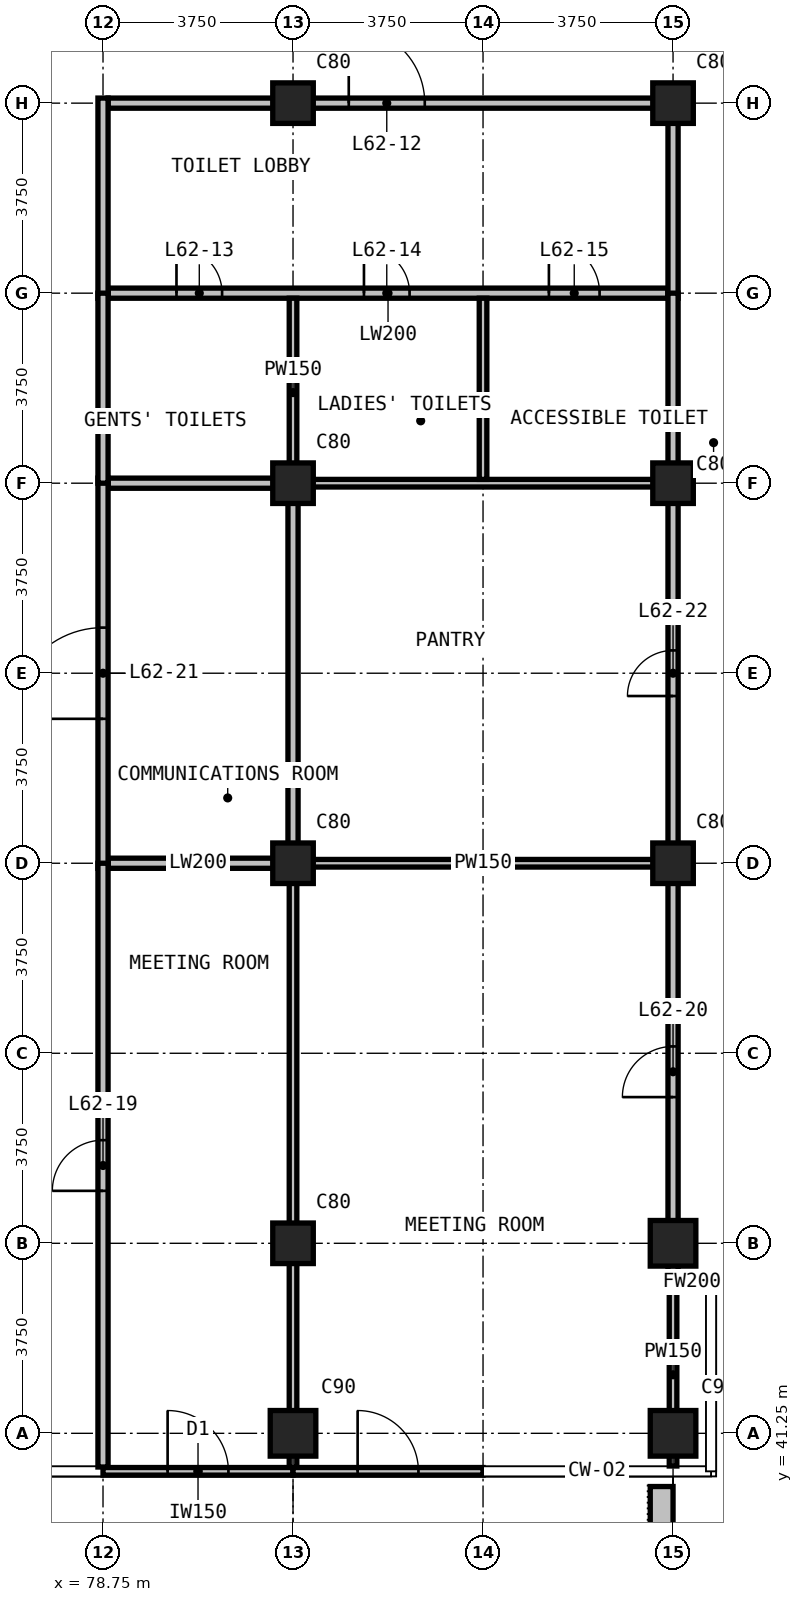
"""IFC4 building model, lengths in metres.
Left out: names, types, materials, properties, quantities, classifications, styles, units other than length and angle.
Written with IfcOpenShell. Run it as: python <this file> out.ifc"""

import sys

from ifc_helpers import new_model, si_unit, direction, frame, frame_2d, origin, origin_2d, place, context, subcontext, project, spatial, rectangle, extrude, element, fill, save


model = new_model("IFC4")
c1 = context("Model", 3, precision=1e-05, world=origin(), true_north=direction((0.0, 1.0)))
c2 = subcontext(c1, "Body", "Model", "MODEL_VIEW")
j1 = project(units=[si_unit("LENGTHUNIT", "METRE"), si_unit("PLANEANGLEUNIT", "RADIAN")], contexts=[c1])
p1 = place(None, origin())
s1 = spatial("IfcSite", under=j1, at=p1, CompositionType="ELEMENT")
p2 = place(p1, origin())
s2 = spatial("IfcBuilding", under=s1, at=p2, CompositionType="ELEMENT")
p3 = place(p2, frame((0.0, 0.0, 239.1)))
s3 = spatial("IfcBuildingStorey", under=s2, at=p3, CompositionType="ELEMENT", Elevation=239.1)
p4 = place(p3, frame((82.5, 41.25, 0.0), z_axis=(0.0, 0.0, 1.0), x_axis=(1.0, 0.0, 0.0)))
e1 = element("IfcColumn", 1, at=p4, inside=s3, PredefinedType="COLUMN", context=c2, shape_type="SweptSolid", body=[
    extrude(rectangle(XDim=0.9, YDim=0.9, at=origin_2d()), origin(), (0.0, 0.0, 1.0), 3.6),
])
for number, where, z_axis, x_axis in (
    (2, (82.5, 45.0, 0.0), (0.0, 0.0, 1.0), (1.0, 0.0, 0.0)),
    (3, (82.5, 52.5, 0.0), (0.0, 0.0, 1.0), (1.0, 0.0, 0.0)),
    (4, (82.5, 60.0, 0.0), (0.0, 0.0, 1.0), (1.0, 0.0, 0.0)),
    (5, (82.5, 67.5, 0.0), (0.0, 0.0, 1.0), (1.0, 0.0, 0.0)),
):
    element("IfcColumn", number, at=place(p3, frame(where, z_axis=z_axis, x_axis=x_axis)), inside=s3, PredefinedType="COLUMN", context=c2, shape_type="SweptSolid", body=[
        extrude(rectangle(XDim=0.8, YDim=0.8, at=origin_2d()), origin(), (0.0, 0.0, 1.0), 3.6),
    ])
for number, where, z_axis, x_axis in (
    (6, (90.0, 41.25, 0.0), (0.0, 0.0, 1.0), (1.0, 0.0, 0.0)),
    (7, (90.0, 45.0, 0.0), (0.0, 0.0, 1.0), (1.0, 0.0, 0.0)),
):
    element("IfcColumn", number, at=place(p3, frame(where, z_axis=z_axis, x_axis=x_axis)), inside=s3, PredefinedType="COLUMN", context=c2, shape_type="SweptSolid", body=[
        extrude(rectangle(XDim=0.9, YDim=0.9, at=origin_2d()), origin(), (0.0, 0.0, 1.0), 3.6),
    ])
for number, where, z_axis, x_axis in (
    (8, (90.0, 52.5, 0.0), (0.0, 0.0, 1.0), (1.0, 0.0, 0.0)),
    (9, (90.0, 60.0, 0.0), (0.0, 0.0, 1.0), (1.0, 0.0, 0.0)),
    (10, (90.0, 67.5, 0.0), (0.0, 0.0, 1.0), (1.0, 0.0, 0.0)),
):
    element("IfcColumn", number, at=place(p3, frame(where, z_axis=z_axis, x_axis=x_axis)), inside=s3, PredefinedType="COLUMN", context=c2, shape_type="SweptSolid", body=[
        extrude(rectangle(XDim=0.8, YDim=0.8, at=origin_2d()), origin(), (0.0, 0.0, 1.0), 3.6),
    ])
p5 = place(p3, frame((78.75, 40.5, 0.0), z_axis=(0.0, 0.0, 1.0), x_axis=(1.0, 0.0, 0.0)))
e11 = element("IfcWall", 11, at=p5, inside=s3, PredefinedType="SOLIDWALL", context=c2, shape_type="SweptSolid", body=[
    extrude(rectangle(XDim=3.75, YDim=0.15, at=frame_2d((1.875, 0.0))), origin(), (0.0, 0.0, 1.0), 3.3),
])
p6 = place(p5, frame((1.275, 0.0, 0.0)))
e12 = element("IfcOpeningElement", 12, at=p6, cuts=e11, PredefinedType="OPENING", context=c2, shape_type="SweptSolid", body=[
    extrude(rectangle(XDim=1.2, YDim=2.4, at=frame_2d((0.6, 1.2))), frame((0.0, 0.085, 0.0), z_axis=(0.0, -1.0, 0.0), x_axis=(1.0, 0.0, 0.0)), (0.0, 0.0, 1.0), 0.17),
])
p7 = place(p3, frame((82.5, 40.5, 0.0), z_axis=(0.0, 0.0, 1.0), x_axis=(1.0, 0.0, 0.0)))
e13 = element("IfcWall", 13, at=p7, inside=s3, PredefinedType="SOLIDWALL", context=c2, shape_type="SweptSolid", body=[
    extrude(rectangle(XDim=3.75, YDim=0.15, at=frame_2d((1.875, 0.0))), origin(), (0.0, 0.0, 1.0), 3.3),
])
p8 = place(p7, frame((1.275, 0.0, 0.0)))
e14 = element("IfcOpeningElement", 14, at=p8, cuts=e13, PredefinedType="OPENING", context=c2, shape_type="SweptSolid", body=[
    extrude(rectangle(XDim=1.2, YDim=2.4, at=frame_2d((0.6, 1.2))), frame((0.0, 0.085, 0.0), z_axis=(0.0, -1.0, 0.0), x_axis=(1.0, 0.0, 0.0)), (0.0, 0.0, 1.0), 0.17),
])
p9 = place(p3, frame((89.775, 40.2, 0.0), z_axis=(0.0, 0.0, 1.0), x_axis=(0.0, -1.0, 0.0)))
e15 = element("IfcWall", 15, at=p9, inside=s3, PredefinedType="USERDEFINED", context=c2, shape_type="SweptSolid", body=[
    extrude(rectangle(XDim=2.35, YDim=0.45, at=frame_2d((1.175, 0.0))), origin(), (0.0, 0.0, 1.0), 1.1),
])
for number, where, z_axis, x_axis in (
    (16, (78.85, 52.5, 0.0), (0.0, 0.0, 1.0), (1.0, 0.0, 0.0)),
    (17, (78.85, 60.0, 0.0), (0.0, 0.0, 1.0), (1.0, 0.0, 0.0)),
):
    element("IfcWall", number, at=place(p3, frame(where, z_axis=z_axis, x_axis=x_axis)), inside=s3, PredefinedType="PARTITIONING", context=c2, shape_type="SweptSolid", body=[
        extrude(rectangle(XDim=3.55, YDim=0.2, at=frame_2d((1.775, 0.0))), origin(), (0.0, 0.0, 1.0), 3.3),
    ])
p10 = place(p3, frame((78.85, 63.75, 0.0), z_axis=(0.0, 0.0, 1.0), x_axis=(1.0, 0.0, 0.0)))
e18 = element("IfcWall", 18, at=p10, inside=s3, PredefinedType="PARTITIONING", context=c2, shape_type="SweptSolid", body=[
    extrude(rectangle(XDim=11.05, YDim=0.2, at=frame_2d((5.525, 0.0))), origin(), (0.0, 0.0, 1.0), 3.3),
])
p11 = place(p10, frame((1.35, 0.0, 0.0)))
e19 = element("IfcOpeningElement", 19, at=p11, cuts=e18, PredefinedType="OPENING", context=c2, shape_type="SweptSolid", body=[
    extrude(rectangle(XDim=0.9, YDim=2.2, at=frame_2d((0.45, 1.1))), frame((0.0, 0.11, 0.0), z_axis=(0.0, -1.0, 0.0), x_axis=(1.0, 0.0, 0.0)), (0.0, 0.0, 1.0), 0.22),
])
p12 = place(p10, frame((5.05, 0.0, 0.0)))
e20 = element("IfcOpeningElement", 20, at=p12, cuts=e18, PredefinedType="OPENING", context=c2, shape_type="SweptSolid", body=[
    extrude(rectangle(XDim=0.9, YDim=2.2, at=frame_2d((0.45, 1.1))), frame((0.0, 0.11, 0.0), z_axis=(0.0, -1.0, 0.0), x_axis=(1.0, 0.0, 0.0)), (0.0, 0.0, 1.0), 0.22),
])
p13 = place(p10, frame((8.7, 0.0, 0.0)))
e21 = element("IfcOpeningElement", 21, at=p13, cuts=e18, PredefinedType="OPENING", context=c2, shape_type="SweptSolid", body=[
    extrude(rectangle(XDim=1.0, YDim=2.2, at=frame_2d((0.5, 1.1))), frame((0.0, 0.11, 0.0), z_axis=(0.0, -1.0, 0.0), x_axis=(1.0, 0.0, 0.0)), (0.0, 0.0, 1.0), 0.22),
])
p14 = place(p3, frame((78.85, 67.5, 0.0), z_axis=(0.0, 0.0, 1.0), x_axis=(1.0, 0.0, 0.0)))
e22 = element("IfcWall", 22, at=p14, inside=s3, PredefinedType="PARTITIONING", context=c2, shape_type="SweptSolid", body=[
    extrude(rectangle(XDim=11.05, YDim=0.2, at=frame_2d((5.525, 0.0))), origin(), (0.0, 0.0, 1.0), 3.3),
])
p15 = place(p14, frame((4.75, 0.0, 0.0)))
e23 = element("IfcOpeningElement", 23, at=p15, cuts=e22, PredefinedType="OPENING", context=c2, shape_type="SweptSolid", body=[
    extrude(rectangle(XDim=1.5, YDim=2.2, at=frame_2d((0.75, 1.1))), frame((0.0, 0.11, 0.0), z_axis=(0.0, -1.0, 0.0), x_axis=(1.0, 0.0, 0.0)), (0.0, 0.0, 1.0), 0.22),
])
p16 = place(p3, frame((78.75, 52.4, 0.0), z_axis=(0.0, 0.0, 1.0), x_axis=(0.0, 1.0, 0.0)))
e24 = element("IfcWall", 24, at=p16, inside=s3, PredefinedType="PARTITIONING", context=c2, shape_type="SweptSolid", body=[
    extrude(rectangle(XDim=7.7, YDim=0.2, at=frame_2d((3.85, 0.0))), origin(), (0.0, 0.0, 1.0), 3.3),
])
p17 = place(p16, frame((2.95, 0.0, 0.0)))
e25 = element("IfcOpeningElement", 25, at=p17, cuts=e24, PredefinedType="OPENING", context=c2, shape_type="SweptSolid", body=[
    extrude(rectangle(XDim=1.8, YDim=2.4, at=frame_2d((0.9, 1.2))), frame((0.0, 0.11, 0.0), z_axis=(0.0, -1.0, 0.0), x_axis=(1.0, 0.0, 0.0)), (0.0, 0.0, 1.0), 0.22),
])
p18 = place(p3, frame((78.75, 63.65, 0.0), z_axis=(0.0, 0.0, 1.0), x_axis=(0.0, 1.0, 0.0)))
e26 = element("IfcWall", 26, at=p18, inside=s3, PredefinedType="PARTITIONING", context=c2, shape_type="SweptSolid", body=[
    extrude(rectangle(XDim=3.95, YDim=0.2, at=frame_2d((1.975, 0.0))), origin(), (0.0, 0.0, 1.0), 3.3),
])
p19 = place(p3, frame((82.5, 52.4, 0.0), z_axis=(0.0, 0.0, 1.0), x_axis=(0.0, 1.0, 0.0)))
e27 = element("IfcWall", 27, at=p19, inside=s3, PredefinedType="PARTITIONING", context=c2, shape_type="SweptSolid", body=[
    extrude(rectangle(XDim=7.7, YDim=0.2, at=frame_2d((3.85, 0.0))), origin(), (0.0, 0.0, 1.0), 3.3),
])
p20 = place(p3, frame((90.0, 63.65, 0.0), z_axis=(0.0, 0.0, 1.0), x_axis=(0.0, 1.0, 0.0)))
e28 = element("IfcWall", 28, at=p20, inside=s3, PredefinedType="PARTITIONING", context=c2, shape_type="SweptSolid", body=[
    extrude(rectangle(XDim=3.95, YDim=0.2, at=frame_2d((1.975, 0.0))), origin(), (0.0, 0.0, 1.0), 3.3),
])
p21 = place(p3, frame((90.1, 44.235, 0.0), z_axis=(0.0, 0.0, 1.0), x_axis=(1.0, 0.0, 0.0)))
e29 = element("IfcWall", 29, at=p21, inside=s3, PredefinedType="PARTITIONING", context=c2, shape_type="SweptSolid", body=[
    extrude(rectangle(XDim=0.545, YDim=0.2, at=frame_2d((0.272, 0.0))), origin(), (0.0, 0.0, 1.0), 3.3),
])
p22 = place(p3, frame((78.75, 40.585, 0.0), z_axis=(0.0, 0.0, 1.0), x_axis=(0.0, 1.0, 0.0)))
e30 = element("IfcWall", 30, at=p22, inside=s3, PredefinedType="PARTITIONING", context=c2, shape_type="SweptSolid", body=[
    extrude(rectangle(XDim=11.915, YDim=0.2, at=frame_2d((5.958, 0.0))), origin(), (0.0, 0.0, 1.0), 3.3),
])
p23 = place(p22, frame((5.45, 0.0, 0.0)))
e31 = element("IfcOpeningElement", 31, at=p23, cuts=e30, PredefinedType="OPENING", context=c2, shape_type="SweptSolid", body=[
    extrude(rectangle(XDim=1.0, YDim=2.2, at=frame_2d((0.5, 1.1))), frame((0.0, 0.11, 0.0), z_axis=(0.0, -1.0, 0.0), x_axis=(1.0, 0.0, 0.0)), (0.0, 0.0, 1.0), 0.22),
])
p24 = place(p3, frame((78.75, 60.0, 0.0), z_axis=(0.0, 0.0, 1.0), x_axis=(0.0, 1.0, 0.0)))
e32 = element("IfcWall", 32, at=p24, inside=s3, PredefinedType="PARTITIONING", context=c2, shape_type="SweptSolid", body=[
    extrude(rectangle(XDim=3.75, YDim=0.2, at=frame_2d((1.875, 0.0))), origin(), (0.0, 0.0, 1.0), 3.3),
])
p25 = place(p3, frame((90.0, 44.135, 0.0), z_axis=(0.0, 0.0, 1.0), x_axis=(0.0, 1.0, 0.0)))
e33 = element("IfcWall", 33, at=p25, inside=s3, PredefinedType="PARTITIONING", context=c2, shape_type="SweptSolid", body=[
    extrude(rectangle(XDim=19.615, YDim=0.2, at=frame_2d((9.808, 0.0))), origin(), (0.0, 0.0, 1.0), 3.3),
])
p26 = place(p25, frame((3.75, 0.0, 0.0)))
e34 = element("IfcOpeningElement", 34, at=p26, cuts=e33, PredefinedType="OPENING", context=c2, shape_type="SweptSolid", body=[
    extrude(rectangle(XDim=1.0, YDim=2.2, at=frame_2d((0.5, 1.1))), frame((0.0, 0.11, 0.0), z_axis=(0.0, -1.0, 0.0), x_axis=(1.0, 0.0, 0.0)), (0.0, 0.0, 1.0), 0.22),
])
p27 = place(p25, frame((11.665, 0.0, 0.0)))
e35 = element("IfcOpeningElement", 35, at=p27, cuts=e33, PredefinedType="OPENING", context=c2, shape_type="SweptSolid", body=[
    extrude(rectangle(XDim=0.9, YDim=2.2, at=frame_2d((0.45, 1.1))), frame((0.0, 0.11, 0.0), z_axis=(0.0, -1.0, 0.0), x_axis=(1.0, 0.0, 0.0)), (0.0, 0.0, 1.0), 0.22),
])
for number, where, z_axis, x_axis in (
    (36, (82.6, 52.5, 0.0), (0.0, 0.0, 1.0), (1.0, 0.0, 0.0)),
    (37, (82.6, 60.0, 0.0), (0.0, 0.0, 1.0), (1.0, 0.0, 0.0)),
):
    element("IfcWall", number, at=place(p3, frame(where, z_axis=z_axis, x_axis=x_axis)), inside=s3, PredefinedType="PARTITIONING", context=c2, shape_type="SweptSolid", body=[
        extrude(rectangle(XDim=7.3, YDim=0.15, at=frame_2d((3.65, 0.0))), origin(), (0.0, 0.0, 1.0), 3.3),
    ])
p28 = place(p3, frame((82.5, 40.585, 0.0), z_axis=(0.0, 0.0, 1.0), x_axis=(0.0, 1.0, 0.0)))
e38 = element("IfcWall", 38, at=p28, inside=s3, PredefinedType="PARTITIONING", context=c2, shape_type="SweptSolid", body=[
    extrude(rectangle(XDim=11.99, YDim=0.15, at=frame_2d((5.995, 0.0))), origin(), (0.0, 0.0, 1.0), 3.3),
])
p29 = place(p3, frame((82.5, 59.925, 0.0), z_axis=(0.0, 0.0, 1.0), x_axis=(0.0, 1.0, 0.0)))
e39 = element("IfcWall", 39, at=p29, inside=s3, PredefinedType="PARTITIONING", context=c2, shape_type="SweptSolid", body=[
    extrude(rectangle(XDim=3.725, YDim=0.15, at=frame_2d((1.862, 0.0))), origin(), (0.0, 0.0, 1.0), 3.3),
])
p30 = place(p3, frame((86.25, 60.075, 0.0), z_axis=(0.0, 0.0, 1.0), x_axis=(0.0, 1.0, 0.0)))
e40 = element("IfcWall", 40, at=p30, inside=s3, PredefinedType="PARTITIONING", context=c2, shape_type="SweptSolid", body=[
    extrude(rectangle(XDim=3.575, YDim=0.15, at=frame_2d((1.788, 0.0))), origin(), (0.0, 0.0, 1.0), 3.3),
])
p31 = place(p3, frame((90.0, 40.605, 0.0), z_axis=(0.0, 0.0, 1.0), x_axis=(0.0, 1.0, 0.0)))
e41 = element("IfcWall", 41, at=p31, inside=s3, PredefinedType="PARTITIONING", context=c2, shape_type="SweptSolid", body=[
    extrude(rectangle(XDim=3.6, YDim=0.15, at=frame_2d((1.8, 0.0))), origin(), (0.0, 0.0, 1.0), 3.3),
])
p32 = place(p6, origin())
e42 = element("IfcDoor", 42, at=p32, inside=s3, OperationType="SINGLE_SWING_LEFT", PredefinedType="DOOR", context=c2, shape_type="SweptSolid", body=[
    extrude(rectangle(XDim=1.2, YDim=2.4, at=frame_2d((0.6, 1.2))), frame((0.0, 0.025, 0.0), z_axis=(0.0, -1.0, 0.0), x_axis=(1.0, 0.0, 0.0)), (0.0, 0.0, 1.0), 0.05),
])
fill(e12, e42)
p33 = place(p8, origin())
e43 = element("IfcDoor", 43, at=p33, inside=s3, OperationType="SINGLE_SWING_LEFT", PredefinedType="DOOR", context=c2, shape_type="SweptSolid", body=[
    extrude(rectangle(XDim=1.2, YDim=2.4, at=frame_2d((0.6, 1.2))), frame((0.0, 0.025, 0.0), z_axis=(0.0, -1.0, 0.0), x_axis=(1.0, 0.0, 0.0)), (0.0, 0.0, 1.0), 0.05),
])
fill(e14, e43)
p34 = place(p15, origin())
e44 = element("IfcDoor", 44, at=p34, inside=s3, OperationType="DOUBLE_DOOR_SINGLE_SWING", PredefinedType="DOOR", context=c2, shape_type="SweptSolid", body=[
    extrude(rectangle(XDim=1.5, YDim=2.2, at=frame_2d((0.75, 1.1))), frame((0.0, 0.025, 0.0), z_axis=(0.0, -1.0, 0.0), x_axis=(1.0, 0.0, 0.0)), (0.0, 0.0, 1.0), 0.05),
])
fill(e23, e44)
p35 = place(p11, origin())
e45 = element("IfcDoor", 45, at=p35, inside=s3, OperationType="SINGLE_SWING_RIGHT", PredefinedType="DOOR", context=c2, shape_type="SweptSolid", body=[
    extrude(rectangle(XDim=0.9, YDim=2.2, at=frame_2d((0.45, 1.1))), frame((0.0, 0.025, 0.0), z_axis=(0.0, -1.0, 0.0), x_axis=(1.0, 0.0, 0.0)), (0.0, 0.0, 1.0), 0.05),
])
fill(e19, e45)
p36 = place(p12, origin())
e46 = element("IfcDoor", 46, at=p36, inside=s3, OperationType="SINGLE_SWING_LEFT", PredefinedType="DOOR", context=c2, shape_type="SweptSolid", body=[
    extrude(rectangle(XDim=0.9, YDim=2.2, at=frame_2d((0.45, 1.1))), frame((0.0, 0.025, 0.0), z_axis=(0.0, -1.0, 0.0), x_axis=(1.0, 0.0, 0.0)), (0.0, 0.0, 1.0), 0.05),
])
fill(e20, e46)
p37 = place(p13, origin())
e47 = element("IfcDoor", 47, at=p37, inside=s3, OperationType="SINGLE_SWING_RIGHT", PredefinedType="DOOR", context=c2, shape_type="SweptSolid", body=[
    extrude(rectangle(XDim=1.0, YDim=2.2, at=frame_2d((0.5, 1.1))), frame((0.0, 0.025, 0.0), z_axis=(0.0, -1.0, 0.0), x_axis=(1.0, 0.0, 0.0)), (0.0, 0.0, 1.0), 0.05),
])
fill(e21, e47)
p38 = place(p23, origin())
e48 = element("IfcDoor", 48, at=p38, inside=s3, OperationType="SINGLE_SWING_LEFT", PredefinedType="DOOR", context=c2, shape_type="SweptSolid", body=[
    extrude(rectangle(XDim=1.0, YDim=2.2, at=frame_2d((0.5, 1.1))), frame((0.0, 0.025, 0.0), z_axis=(0.0, -1.0, 0.0), x_axis=(1.0, 0.0, 0.0)), (0.0, 0.0, 1.0), 0.05),
])
fill(e31, e48)
p39 = place(p26, origin())
e49 = element("IfcDoor", 49, at=p39, inside=s3, OperationType="SINGLE_SWING_LEFT", PredefinedType="DOOR", context=c2, shape_type="SweptSolid", body=[
    extrude(rectangle(XDim=1.0, YDim=2.2, at=frame_2d((0.5, 1.1))), frame((0.0, 0.025, 0.0), z_axis=(0.0, -1.0, 0.0), x_axis=(1.0, 0.0, 0.0)), (0.0, 0.0, 1.0), 0.05),
])
fill(e34, e49)
p40 = place(p17, origin())
e50 = element("IfcDoor", 50, at=p40, inside=s3, OperationType="DOUBLE_DOOR_SINGLE_SWING", PredefinedType="DOOR", context=c2, shape_type="SweptSolid", body=[
    extrude(rectangle(XDim=1.8, YDim=2.4, at=frame_2d((0.9, 1.2))), frame((0.0, 0.025, 0.0), z_axis=(0.0, -1.0, 0.0), x_axis=(1.0, 0.0, 0.0)), (0.0, 0.0, 1.0), 0.05),
])
fill(e25, e50)
p41 = place(p27, origin())
e51 = element("IfcDoor", 51, at=p41, inside=s3, OperationType="SINGLE_SWING_LEFT", PredefinedType="DOOR", context=c2, shape_type="SweptSolid", body=[
    extrude(rectangle(XDim=0.9, YDim=2.2, at=frame_2d((0.45, 1.1))), frame((0.0, 0.025, 0.0), z_axis=(0.0, -1.0, 0.0), x_axis=(1.0, 0.0, 0.0)), (0.0, 0.0, 1.0), 0.05),
])
fill(e35, e51)
save(model, sys.argv[1])
